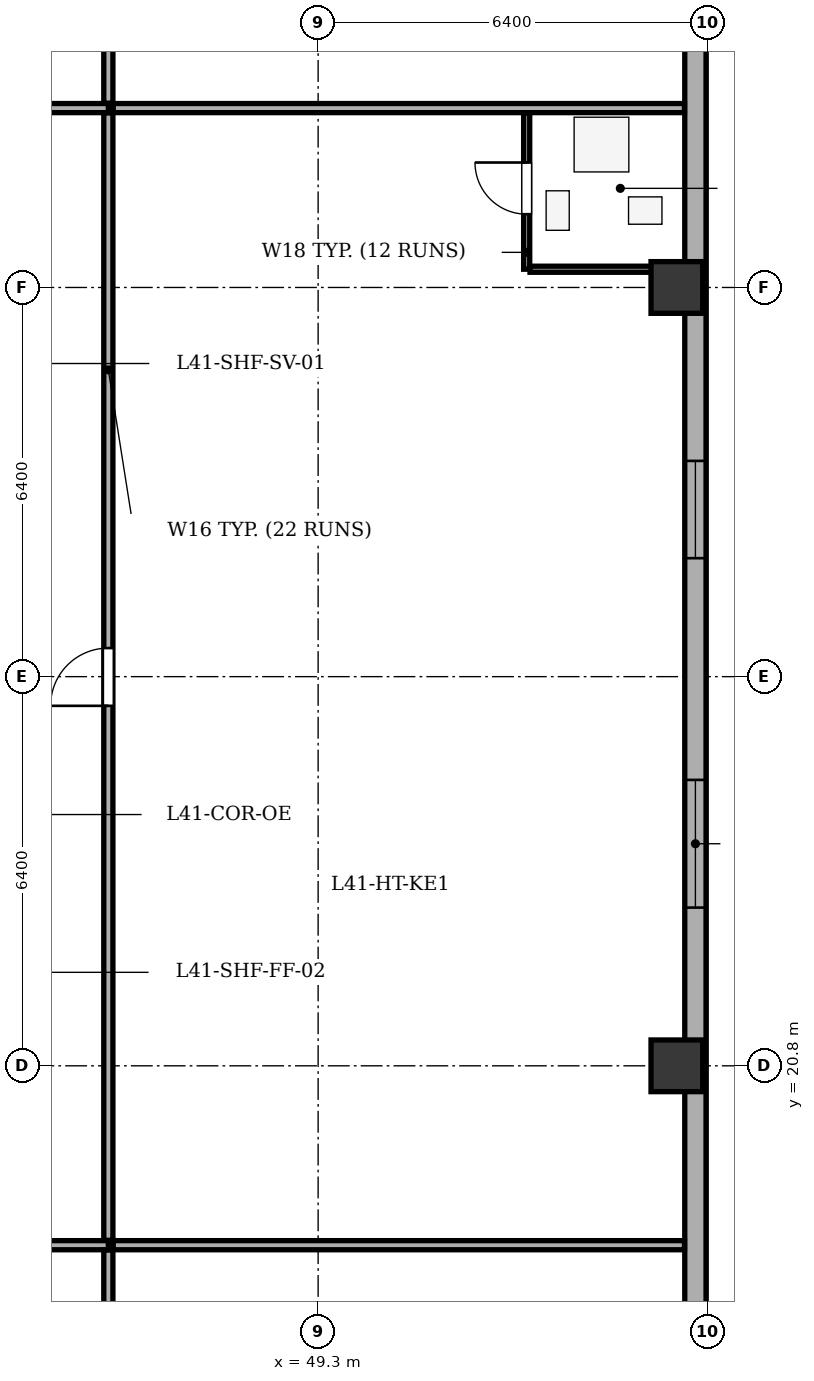
"""IFC4 building model, lengths in metres.
Left out: names, types, materials, properties, quantities, classifications, styles, units other than length and angle.
Written with IfcOpenShell. Run it as: python <this file> out.ifc"""

import sys

from ifc_helpers import new_model, si_unit, direction, frame, frame_2d, origin, origin_2d, place, context, subcontext, project, spatial, rectangle, extrude, element, fill, save


model = new_model("IFC4")
c1 = context("Model", 3, precision=1e-05, world=origin(), true_north=direction((0.0, 1.0)))
c2 = subcontext(c1, "Body", "Model", "MODEL_VIEW")
j1 = project(units=[si_unit("LENGTHUNIT", "METRE"), si_unit("PLANEANGLEUNIT", "RADIAN")], contexts=[c1])
p1 = place(None, origin())
s1 = spatial("IfcSite", under=j1, at=p1, CompositionType="ELEMENT")
p2 = place(p1, origin())
s2 = spatial("IfcBuilding", under=s1, at=p2, CompositionType="ELEMENT")
p3 = place(p2, frame((0.0, 0.0, 162.3)))
s3 = spatial("IfcBuildingStorey", under=s2, at=p3, CompositionType="ELEMENT", Elevation=162.3)
for number, where, z_axis, x_axis in (
    (1, (55.2, 20.8, 0.0), (0.0, 0.0, 1.0), (1.0, 0.0, 0.0)),
    (2, (55.2, 33.6, 0.0), (0.0, 0.0, 1.0), (1.0, 0.0, 0.0)),
):
    element("IfcColumn", number, at=place(p3, frame(where, z_axis=z_axis, x_axis=x_axis)), inside=s3, PredefinedType="COLUMN", context=c2, shape_type="SweptSolid", body=[
        extrude(rectangle(XDim=0.85, YDim=0.85, at=origin_2d()), origin(), (0.0, 0.0, 1.0), 3.5),
    ])
p4 = place(p3, frame((55.505, 47.9, 0.0), z_axis=(0.0, 0.0, 1.0), x_axis=(0.0, -1.0, 0.0)))
e3 = element("IfcWall", 3, at=p4, inside=s3, PredefinedType="STANDARD", context=c2, shape_type="SweptSolid", body=[
    extrude(rectangle(XDim=35.0, YDim=0.35, at=frame_2d((17.5, 0.0))), origin(), (0.0, 0.0, 1.0), 2.785),
])
p5 = place(p4, frame((2.595, 0.0, 0.75)))
e4 = element("IfcOpeningElement", 4, at=p5, cuts=e3, PredefinedType="OPENING", context=c2, shape_type="SweptSolid", body=[
    extrude(rectangle(XDim=1.6, YDim=1.75, at=frame_2d((0.8, 0.875))), frame((0.0, 0.185, 0.0), z_axis=(0.0, -1.0, 0.0), x_axis=(1.0, 0.0, 0.0)), (0.0, 0.0, 1.0), 0.37),
])
p6 = place(p4, frame((7.181, 0.0, 0.75)))
e5 = element("IfcOpeningElement", 5, at=p6, cuts=e3, PredefinedType="OPENING", context=c2, shape_type="SweptSolid", body=[
    extrude(rectangle(XDim=2.1, YDim=1.75, at=frame_2d((1.05, 0.875))), frame((0.0, 0.185, 0.0), z_axis=(0.0, -1.0, 0.0), x_axis=(1.0, 0.0, 0.0)), (0.0, 0.0, 1.0), 0.37),
])
p7 = place(p4, frame((17.152, 0.0, 0.75)))
e6 = element("IfcOpeningElement", 6, at=p7, cuts=e3, PredefinedType="OPENING", context=c2, shape_type="SweptSolid", body=[
    extrude(rectangle(XDim=1.6, YDim=1.75, at=frame_2d((0.8, 0.875))), frame((0.0, 0.185, 0.0), z_axis=(0.0, -1.0, 0.0), x_axis=(1.0, 0.0, 0.0)), (0.0, 0.0, 1.0), 0.37),
])
p8 = place(p4, frame((22.398, 0.0, 0.75)))
e7 = element("IfcOpeningElement", 7, at=p8, cuts=e3, PredefinedType="OPENING", context=c2, shape_type="SweptSolid", body=[
    extrude(rectangle(XDim=2.1, YDim=1.75, at=frame_2d((1.05, 0.875))), frame((0.0, 0.185, 0.0), z_axis=(0.0, -1.0, 0.0), x_axis=(1.0, 0.0, 0.0)), (0.0, 0.0, 1.0), 0.37),
])
p9 = place(p4, frame((31.588, 0.0, 0.75)))
e8 = element("IfcOpeningElement", 8, at=p9, cuts=e3, PredefinedType="OPENING", context=c2, shape_type="SweptSolid", body=[
    extrude(rectangle(XDim=1.6, YDim=1.75, at=frame_2d((0.8, 0.875))), frame((0.0, 0.185, 0.0), z_axis=(0.0, -1.0, 0.0), x_axis=(1.0, 0.0, 0.0)), (0.0, 0.0, 1.0), 0.37),
])
p10 = place(p3, frame((38.102, 17.85, 0.0), z_axis=(0.0, 0.0, 1.0), x_axis=(1.0, 0.0, 0.0)))
e9 = element("IfcWall", 9, at=p10, inside=s3, PredefinedType="PARTITIONING", context=c2, shape_type="SweptSolid", body=[
    extrude(rectangle(XDim=7.748, YDim=0.15, at=frame_2d((3.874, 0.0))), origin(), (0.0, 0.0, 1.0), 3.2),
])
p11 = place(p10, frame((3.394, 0.0, 0.0)))
e10 = element("IfcOpeningElement", 10, at=p11, cuts=e9, PredefinedType="OPENING", context=c2, shape_type="SweptSolid", body=[
    extrude(rectangle(XDim=0.95, YDim=2.1, at=frame_2d((0.475, 1.05))), frame((0.0, 0.085, 0.0), z_axis=(0.0, -1.0, 0.0), x_axis=(1.0, 0.0, 0.0)), (0.0, 0.0, 1.0), 0.17),
])
p12 = place(p3, frame((45.85, 8.275, 0.0), z_axis=(0.0, 0.0, 1.0), x_axis=(0.0, 1.0, 0.0)))
e11 = element("IfcWall", 11, at=p12, inside=s3, PredefinedType="PARTITIONING", context=c2, shape_type="SweptSolid", body=[
    extrude(rectangle(XDim=9.495, YDim=0.15, at=frame_2d((4.748, 0.0))), origin(), (0.0, 0.0, 1.0), 3.2),
])
p13 = place(p3, frame((35.377, 36.55, 0.0), z_axis=(0.0, 0.0, 1.0), x_axis=(1.0, 0.0, 0.0)))
e12 = element("IfcWall", 12, at=p13, inside=s3, PredefinedType="PARTITIONING", context=c2, shape_type="SweptSolid", body=[
    extrude(rectangle(XDim=10.473, YDim=0.15, at=frame_2d((5.237, 0.0))), origin(), (0.0, 0.0, 1.0), 3.2),
])
p14 = place(p13, frame((4.676, 0.0, 0.0)))
e13 = element("IfcOpeningElement", 13, at=p14, cuts=e12, PredefinedType="OPENING", context=c2, shape_type="SweptSolid", body=[
    extrude(rectangle(XDim=1.0, YDim=2.1, at=frame_2d((0.5, 1.05))), frame((0.0, 0.085, 0.0), z_axis=(0.0, -1.0, 0.0), x_axis=(1.0, 0.0, 0.0)), (0.0, 0.0, 1.0), 0.17),
])
p15 = place(p3, frame((45.85, 36.63, 0.0), z_axis=(0.0, 0.0, 1.0), x_axis=(0.0, 1.0, 0.0)))
e14 = element("IfcWall", 14, at=p15, inside=s3, PredefinedType="PARTITIONING", context=c2, shape_type="SweptSolid", body=[
    extrude(rectangle(XDim=15.895, YDim=0.15, at=frame_2d((7.948, 0.0))), origin(), (0.0, 0.0, 1.0), 3.2),
])
for number, where, z_axis, x_axis in (
    (15, (45.93, 17.85, 0.0), (0.0, 0.0, 1.0), (1.0, 0.0, 0.0)),
    (16, (45.93, 36.55, 0.0), (0.0, 0.0, 1.0), (1.0, 0.0, 0.0)),
):
    element("IfcWall", number, at=place(p3, frame(where, z_axis=z_axis, x_axis=x_axis)), inside=s3, PredefinedType="PARTITIONING", context=c2, shape_type="SweptSolid", body=[
        extrude(rectangle(XDim=9.395, YDim=0.15, at=frame_2d((4.698, 0.0))), origin(), (0.0, 0.0, 1.0), 3.2),
    ])
p16 = place(p3, frame((45.85, 17.93, 0.0), z_axis=(0.0, 0.0, 1.0), x_axis=(0.0, 1.0, 0.0)))
e17 = element("IfcWall", 17, at=p16, inside=s3, PredefinedType="PARTITIONING", context=c2, shape_type="SweptSolid", body=[
    extrude(rectangle(XDim=18.54, YDim=0.15, at=frame_2d((9.27, 0.0))), origin(), (0.0, 0.0, 1.0), 3.2),
])
p17 = place(p16, frame((8.79, 0.0, 0.0)))
e18 = element("IfcOpeningElement", 18, at=p17, cuts=e17, PredefinedType="OPENING", context=c2, shape_type="SweptSolid", body=[
    extrude(rectangle(XDim=0.95, YDim=2.1, at=frame_2d((0.475, 1.05))), frame((0.0, 0.085, 0.0), z_axis=(0.0, -1.0, 0.0), x_axis=(1.0, 0.0, 0.0)), (0.0, 0.0, 1.0), 0.17),
])
p18 = place(p3, frame((52.73, 33.9, 0.0), z_axis=(0.0, 0.0, 1.0), x_axis=(0.0, 1.0, 0.0)))
e19 = element("IfcWall", 19, at=p18, inside=s3, PredefinedType="PARTITIONING", context=c2, shape_type="SweptSolid", body=[
    extrude(rectangle(XDim=2.57, YDim=0.1, at=frame_2d((1.285, 0.0))), origin(), (0.0, 0.0, 1.0), 3.2),
])
p19 = place(p18, frame((0.905, 0.0, 0.0)))
e20 = element("IfcOpeningElement", 20, at=p19, cuts=e19, PredefinedType="OPENING", context=c2, shape_type="SweptSolid", body=[
    extrude(rectangle(XDim=0.85, YDim=2.05, at=frame_2d((0.425, 1.025))), frame((0.0, 0.06, 0.0), z_axis=(0.0, -1.0, 0.0), x_axis=(1.0, 0.0, 0.0)), (0.0, 0.0, 1.0), 0.12),
])
p20 = place(p3, frame((52.785, 33.9, 0.0), z_axis=(0.0, 0.0, 1.0), x_axis=(1.0, 0.0, 0.0)))
e21 = element("IfcWall", 21, at=p20, inside=s3, PredefinedType="PARTITIONING", context=c2, shape_type="SweptSolid", body=[
    extrude(rectangle(XDim=2.54, YDim=0.1, at=frame_2d((1.27, 0.0))), origin(), (0.0, 0.0, 1.0), 2.535),
])
p21 = place(p7, origin())
e22 = element("IfcWindow", 22, at=p21, inside=s3, PartitioningType="SINGLE_PANEL", PredefinedType="WINDOW", context=c2, shape_type="SweptSolid", body=[
    extrude(rectangle(XDim=1.6, YDim=1.75, at=frame_2d((0.8, 0.875))), frame((0.0, -0.01, 0.0), z_axis=(0.0, -1.0, 0.0), x_axis=(1.0, 0.0, 0.0)), (0.0, 0.0, 1.0), 0.06),
])
fill(e6, e22)
p22 = place(p8, origin())
e23 = element("IfcWindow", 23, at=p22, inside=s3, PartitioningType="SINGLE_PANEL", PredefinedType="WINDOW", context=c2, shape_type="SweptSolid", body=[
    extrude(rectangle(XDim=2.1, YDim=1.75, at=frame_2d((1.05, 0.875))), frame((0.0, -0.01, 0.0), z_axis=(0.0, -1.0, 0.0), x_axis=(1.0, 0.0, 0.0)), (0.0, 0.0, 1.0), 0.06),
])
fill(e7, e23)
p23 = place(p19, origin())
e24 = element("IfcDoor", 24, at=p23, inside=s3, OperationType="SINGLE_SWING_RIGHT", PredefinedType="DOOR", context=c2, shape_type="SweptSolid", body=[
    extrude(rectangle(XDim=0.85, YDim=2.05, at=frame_2d((0.425, 1.025))), frame((0.0, 0.025, 0.0), z_axis=(0.0, -1.0, 0.0), x_axis=(1.0, 0.0, 0.0)), (0.0, 0.0, 1.0), 0.05),
])
fill(e20, e24)
p24 = place(p17, origin())
e25 = element("IfcDoor", 25, at=p24, inside=s3, OperationType="SINGLE_SWING_LEFT", PredefinedType="DOOR", context=c2, shape_type="SweptSolid", body=[
    extrude(rectangle(XDim=0.95, YDim=2.1, at=frame_2d((0.475, 1.05))), frame((0.0, 0.025, 0.0), z_axis=(0.0, -1.0, 0.0), x_axis=(1.0, 0.0, 0.0)), (0.0, 0.0, 1.0), 0.05),
])
fill(e18, e25)
save(model, sys.argv[1])
